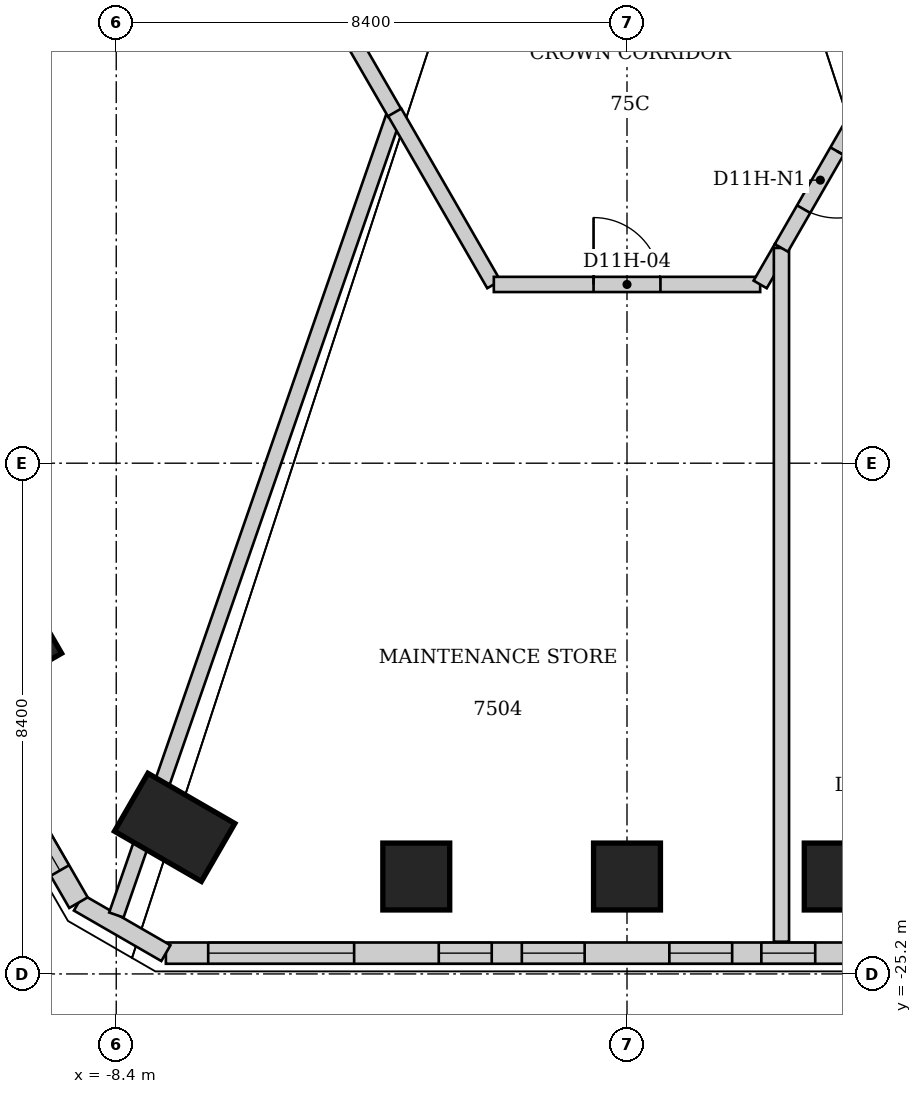
"""IFC4 building model, lengths in metres.
Left out: names, types, materials, properties, quantities, classifications, styles, units other than length and angle.
Written with IfcOpenShell. Run it as: python <this file> out.ifc"""

import sys

from ifc_helpers import new_model, si_unit, direction, frame, frame_2d, origin, origin_2d, place, context, subcontext, project, spatial, polyline, rectangle, outline, extrude, element, fill, save


model = new_model("IFC4")
c1 = context("Model", 3, precision=1e-05, world=origin(), true_north=direction((0.0, 1.0)))
c2 = subcontext(c1, "Body", "Model", "MODEL_VIEW")
j1 = project(units=[si_unit("LENGTHUNIT", "METRE"), si_unit("PLANEANGLEUNIT", "RADIAN")], contexts=[c1])
p1 = place(None, origin())
s1 = spatial("IfcSite", under=j1, at=p1, CompositionType="ELEMENT")
p2 = place(p1, origin())
s2 = spatial("IfcBuilding", under=s1, at=p2, CompositionType="ELEMENT")
p3 = place(p2, frame((0.0, 0.0, 298.8)))
s3 = spatial("IfcBuildingStorey", under=s2, at=p3, CompositionType="ELEMENT", Elevation=298.8)
for number, where, z_axis, x_axis in (
    (1, (3.466, -23.598, 0.0), (0.0, 0.0, 1.0), (0.0, -1.0, 0.0)),
    (2, (0.0, -23.598, 0.0), (0.0, 0.0, 1.0), (0.0, -1.0, 0.0)),
    (3, (-3.466, -23.598, 0.0), (0.0, 0.0, 1.0), (0.0, -1.0, 0.0)),
):
    element("IfcColumn", number, at=place(p3, frame(where, z_axis=z_axis, x_axis=x_axis)), inside=s3, PredefinedType="COLUMN", context=c2, shape_type="SweptSolid", body=[
        extrude(rectangle(XDim=1.1, YDim=1.1, at=origin_2d()), origin(), (0.0, 0.0, 1.0), 6.118),
    ])
p4 = place(p3, frame((-7.439, -22.79, 0.0), z_axis=(0.0, 0.0, 1.0), x_axis=(-0.5, -0.866025403784, 0.0)))
e4 = element("IfcColumn", 4, at=p4, inside=s3, PredefinedType="COLUMN", context=c2, shape_type="SweptSolid", body=[
    extrude(rectangle(XDim=1.1, YDim=1.65, at=origin_2d()), origin(), (0.0, 0.0, 1.0), 6.335),
])
p5 = place(p3, frame((-10.05, -19.725, 0.0), z_axis=(0.0, 0.0, 1.0), x_axis=(-0.866025403784, -0.5, 0.0)))
e5 = element("IfcColumn", 5, at=p5, inside=s3, PredefinedType="COLUMN", context=c2, shape_type="SweptSolid", body=[
    extrude(rectangle(XDim=1.1, YDim=1.1, at=origin_2d()), origin(), (0.0, 0.0, 1.0), 7.156),
])
p6 = place(p3, frame((7.583, -24.858, 0.0), z_axis=(0.0, 0.0, 1.0), x_axis=(-1.0, 0.0, 0.0)))
e6 = element("IfcWall", 6, at=p6, inside=s3, PredefinedType="SOLIDWALL", context=c2, shape_type="SweptSolid", body=[
    extrude(outline(polyline([(0.0, 0.0), (15.167, 0.0), (15.167, 5.775), (0.0, 5.775), (0.0, 0.0)])), frame((0.0, 0.175, 0.0), z_axis=(0.0, -1.0, 0.0), x_axis=(1.0, 0.0, 0.0)), (0.0, 0.0, 1.0), 0.35),
])
p7 = place(p6, frame((0.696, 0.0, 0.6)))
e7 = element("IfcOpeningElement", 7, at=p7, cuts=e6, PredefinedType="OPENING", context=c2, shape_type="SweptSolid", body=[
    extrude(rectangle(XDim=2.4, YDim=3.6, at=frame_2d((1.2, 1.8))), frame((0.0, 0.185, 0.0), z_axis=(0.0, -1.0, 0.0), x_axis=(1.0, 0.0, 0.0)), (0.0, 0.0, 1.0), 0.37),
])
p8 = place(p6, frame((4.488, 0.0, 2.729)))
e8 = element("IfcOpeningElement", 8, at=p8, cuts=e6, PredefinedType="OPENING", context=c2, shape_type="SweptSolid", body=[
    extrude(rectangle(XDim=0.886, YDim=1.471, at=frame_2d((0.443, 0.735))), frame((0.0, 0.185, 0.0), z_axis=(0.0, -1.0, 0.0), x_axis=(1.0, 0.0, 0.0)), (0.0, 0.0, 1.0), 0.37),
])
p9 = place(p6, frame((5.854, 0.0, 0.601)))
e9 = element("IfcOpeningElement", 9, at=p9, cuts=e6, PredefinedType="OPENING", context=c2, shape_type="SweptSolid", body=[
    extrude(rectangle(XDim=1.033, YDim=1.719, at=frame_2d((0.517, 0.859))), frame((0.0, 0.185, 0.0), z_axis=(0.0, -1.0, 0.0), x_axis=(1.0, 0.0, 0.0)), (0.0, 0.0, 1.0), 0.37),
])
p10 = place(p6, frame((8.28, 0.0, 0.601)))
e10 = element("IfcOpeningElement", 10, at=p10, cuts=e6, PredefinedType="OPENING", context=c2, shape_type="SweptSolid", body=[
    extrude(rectangle(XDim=1.033, YDim=1.719, at=frame_2d((0.517, 0.859))), frame((0.0, 0.185, 0.0), z_axis=(0.0, -1.0, 0.0), x_axis=(1.0, 0.0, 0.0)), (0.0, 0.0, 1.0), 0.37),
])
p11 = place(p6, frame((9.808, 0.0, 2.704)))
e11 = element("IfcOpeningElement", 11, at=p11, cuts=e6, PredefinedType="OPENING", context=c2, shape_type="SweptSolid", body=[
    extrude(rectangle(XDim=0.871, YDim=1.496, at=frame_2d((0.436, 0.748))), frame((0.0, 0.185, 0.0), z_axis=(0.0, -1.0, 0.0), x_axis=(1.0, 0.0, 0.0)), (0.0, 0.0, 1.0), 0.37),
])
p12 = place(p6, frame((12.071, 0.0, 0.6)))
e12 = element("IfcOpeningElement", 12, at=p12, cuts=e6, PredefinedType="OPENING", context=c2, shape_type="SweptSolid", body=[
    extrude(rectangle(XDim=2.4, YDim=3.6, at=frame_2d((1.2, 1.8))), frame((0.0, 0.185, 0.0), z_axis=(0.0, -1.0, 0.0), x_axis=(1.0, 0.0, 0.0)), (0.0, 0.0, 1.0), 0.37),
])
p13 = place(p3, frame((-7.583, -24.858, 0.0), z_axis=(0.0, 0.0, 1.0), x_axis=(-0.865989634427, 0.500061949227, 0.0)))
e13 = element("IfcWall", 13, at=p13, inside=s3, PredefinedType="SOLIDWALL", context=c2, shape_type="SweptSolid", body=[
    extrude(outline(polyline([(0.0, 0.0), (1.66, 0.0), (1.66, 6.009), (0.0, 5.787), (0.0, 0.0)])), frame((0.0, 0.15, 0.0), z_axis=(0.0, -1.0, 0.0), x_axis=(1.0, 0.0, 0.0)), (0.0, 0.0, 1.0), 0.3),
])
p14 = place(p3, frame((-9.021, -24.028, 0.0), z_axis=(0.0, 0.0, 1.0), x_axis=(-0.499997560549, 0.866026812198, 0.0)))
e14 = element("IfcWall", 14, at=p14, inside=s3, PredefinedType="SOLIDWALL", context=c2, shape_type="SweptSolid", body=[
    extrude(outline(polyline([(0.0, 0.0), (32.597, 0.0), (32.597, 13.584), (0.0, 6.021), (0.0, 0.0)])), frame((0.0, 0.175, 0.0), z_axis=(0.0, -1.0, 0.0), x_axis=(1.0, 0.0, 0.0)), (0.0, 0.0, 1.0), 0.35),
])
p15 = place(p14, frame((0.611, 0.0, 0.6)))
e15 = element("IfcOpeningElement", 15, at=p15, cuts=e14, PredefinedType="OPENING", context=c2, shape_type="SweptSolid", body=[
    extrude(rectangle(XDim=2.4, YDim=3.6, at=frame_2d((1.2, 1.8))), frame((0.0, 0.185, 0.0), z_axis=(0.0, -1.0, 0.0), x_axis=(1.0, 0.0, 0.0)), (0.0, 0.0, 1.0), 0.37),
])
p16 = place(p14, frame((4.233, 0.0, 0.6)))
e16 = element("IfcOpeningElement", 16, at=p16, cuts=e14, PredefinedType="OPENING", context=c2, shape_type="SweptSolid", body=[
    extrude(rectangle(XDim=2.4, YDim=3.6, at=frame_2d((1.2, 1.8))), frame((0.0, 0.185, 0.0), z_axis=(0.0, -1.0, 0.0), x_axis=(1.0, 0.0, 0.0)), (0.0, 0.0, 1.0), 0.37),
])
p17 = place(p14, frame((7.855, 0.0, 2.72)))
e17 = element("IfcOpeningElement", 17, at=p17, cuts=e14, PredefinedType="OPENING", context=c2, shape_type="SweptSolid", body=[
    extrude(rectangle(XDim=0.6, YDim=1.48, at=frame_2d((0.3, 0.74))), frame((0.0, 0.185, 0.0), z_axis=(0.0, -1.0, 0.0), x_axis=(1.0, 0.0, 0.0)), (0.0, 0.0, 1.0), 0.37),
])
p18 = place(p14, frame((9.259, 0.0, 0.601)))
e18 = element("IfcOpeningElement", 18, at=p18, cuts=e14, PredefinedType="OPENING", context=c2, shape_type="SweptSolid", body=[
    extrude(rectangle(XDim=0.995, YDim=2.449, at=frame_2d((0.498, 1.225))), frame((0.0, 0.185, 0.0), z_axis=(0.0, -1.0, 0.0), x_axis=(1.0, 0.0, 0.0)), (0.0, 0.0, 1.0), 0.37),
])
p19 = place(p14, frame((11.477, 0.0, 0.601)))
e19 = element("IfcOpeningElement", 19, at=p19, cuts=e14, PredefinedType="OPENING", context=c2, shape_type="SweptSolid", body=[
    extrude(rectangle(XDim=1.261, YDim=3.099, at=frame_2d((0.63, 1.55))), frame((0.0, 0.185, 0.0), z_axis=(0.0, -1.0, 0.0), x_axis=(1.0, 0.0, 0.0)), (0.0, 0.0, 1.0), 0.37),
])
p20 = place(p14, frame((15.098, 0.0, 0.6)))
e20 = element("IfcOpeningElement", 20, at=p20, cuts=e14, PredefinedType="OPENING", context=c2, shape_type="SweptSolid", body=[
    extrude(rectangle(XDim=2.4, YDim=3.6, at=frame_2d((1.2, 1.8))), frame((0.0, 0.185, 0.0), z_axis=(0.0, -1.0, 0.0), x_axis=(1.0, 0.0, 0.0)), (0.0, 0.0, 1.0), 0.37),
])
p21 = place(p14, frame((19.676, 0.0, 0.601)))
e21 = element("IfcOpeningElement", 21, at=p21, cuts=e14, PredefinedType="OPENING", context=c2, shape_type="SweptSolid", body=[
    extrude(rectangle(XDim=1.444, YDim=3.599, at=frame_2d((0.722, 1.8))), frame((0.0, 0.185, 0.0), z_axis=(0.0, -1.0, 0.0), x_axis=(1.0, 0.0, 0.0)), (0.0, 0.0, 1.0), 0.37),
])
p22 = place(p14, frame((22.343, 0.0, 0.601)))
e22 = element("IfcOpeningElement", 22, at=p22, cuts=e14, PredefinedType="OPENING", context=c2, shape_type="SweptSolid", body=[
    extrude(rectangle(XDim=1.024, YDim=3.249, at=frame_2d((0.512, 1.625))), frame((0.0, 0.185, 0.0), z_axis=(0.0, -1.0, 0.0), x_axis=(1.0, 0.0, 0.0)), (0.0, 0.0, 1.0), 0.37),
])
p23 = place(p14, frame((24.285, 0.0, 3.005)))
e23 = element("IfcOpeningElement", 23, at=p23, cuts=e14, PredefinedType="OPENING", context=c2, shape_type="SweptSolid", body=[
    extrude(rectangle(XDim=0.457, YDim=1.195, at=frame_2d((0.229, 0.598))), frame((0.0, 0.185, 0.0), z_axis=(0.0, -1.0, 0.0), x_axis=(1.0, 0.0, 0.0)), (0.0, 0.0, 1.0), 0.37),
])
p24 = place(p14, frame((25.964, 0.0, 0.6)))
e24 = element("IfcOpeningElement", 24, at=p24, cuts=e14, PredefinedType="OPENING", context=c2, shape_type="SweptSolid", body=[
    extrude(rectangle(XDim=2.4, YDim=3.6, at=frame_2d((1.2, 1.8))), frame((0.0, 0.185, 0.0), z_axis=(0.0, -1.0, 0.0), x_axis=(1.0, 0.0, 0.0)), (0.0, 0.0, 1.0), 0.37),
])
p25 = place(p14, frame((29.586, 0.0, 0.6)))
e25 = element("IfcOpeningElement", 25, at=p25, cuts=e14, PredefinedType="OPENING", context=c2, shape_type="SweptSolid", body=[
    extrude(rectangle(XDim=2.4, YDim=3.6, at=frame_2d((1.2, 1.8))), frame((0.0, 0.185, 0.0), z_axis=(0.0, -1.0, 0.0), x_axis=(1.0, 0.0, 0.0)), (0.0, 0.0, 1.0), 0.37),
])
p26 = place(p14, frame((13.498, 0.0, 5.6)))
e26 = element("IfcOpeningElement", 26, at=p26, cuts=e14, PredefinedType="OPENING", context=c2, shape_type="SweptSolid", body=[
    extrude(rectangle(XDim=2.0, YDim=2.4, at=frame_2d((1.0, 1.2))), frame((0.0, 0.185, 0.0), z_axis=(0.0, -1.0, 0.0), x_axis=(1.0, 0.0, 0.0)), (0.0, 0.0, 1.0), 0.37),
])
p27 = place(p14, frame((17.098, 0.0, 5.6)))
e27 = element("IfcOpeningElement", 27, at=p27, cuts=e14, PredefinedType="OPENING", context=c2, shape_type="SweptSolid", body=[
    extrude(rectangle(XDim=2.0, YDim=2.4, at=frame_2d((1.0, 1.2))), frame((0.0, 0.185, 0.0), z_axis=(0.0, -1.0, 0.0), x_axis=(1.0, 0.0, 0.0)), (0.0, 0.0, 1.0), 0.37),
])
p28 = place(p14, frame((20.792, 0.0, 5.601)))
e28 = element("IfcOpeningElement", 28, at=p28, cuts=e14, PredefinedType="OPENING", context=c2, shape_type="SweptSolid", body=[
    extrude(rectangle(XDim=1.348, YDim=2.124, at=frame_2d((0.674, 1.062))), frame((0.0, 0.185, 0.0), z_axis=(0.0, -1.0, 0.0), x_axis=(1.0, 0.0, 0.0)), (0.0, 0.0, 1.0), 0.37),
])
p29 = place(p14, frame((24.298, 0.0, 5.6)))
e29 = element("IfcOpeningElement", 29, at=p29, cuts=e14, PredefinedType="OPENING", context=c2, shape_type="SweptSolid", body=[
    extrude(rectangle(XDim=2.0, YDim=2.4, at=frame_2d((1.0, 1.2))), frame((0.0, 0.185, 0.0), z_axis=(0.0, -1.0, 0.0), x_axis=(1.0, 0.0, 0.0)), (0.0, 0.0, 1.0), 0.37),
])
p30 = place(p14, frame((27.898, 0.0, 5.6)))
e30 = element("IfcOpeningElement", 30, at=p30, cuts=e14, PredefinedType="OPENING", context=c2, shape_type="SweptSolid", body=[
    extrude(rectangle(XDim=2.0, YDim=2.4, at=frame_2d((1.0, 1.2))), frame((0.0, 0.185, 0.0), z_axis=(0.0, -1.0, 0.0), x_axis=(1.0, 0.0, 0.0)), (0.0, 0.0, 1.0), 0.37),
])
p31 = place(p3, frame((-8.398, -24.23, 0.0), z_axis=(0.0, 0.0, 1.0), x_axis=(0.327859974014, 0.944726329388, 0.0)))
e31 = element("IfcWall", 31, at=p31, inside=s3, PredefinedType="PARTITIONING", context=c2, shape_type="SweptSolid", body=[
    extrude(rectangle(XDim=13.962, YDim=0.25, at=frame_2d((6.981, 0.0))), origin(), (0.0, 0.0, 1.0), 5.0),
])
p32 = place(p3, frame((-3.82, -11.04, 0.0), z_axis=(0.0, 0.0, 1.0), x_axis=(-0.50042430987, 0.865780289733, 0.0)))
e32 = element("IfcWall", 32, at=p32, inside=s3, PredefinedType="PARTITIONING", context=c2, shape_type="SweptSolid", body=[
    extrude(rectangle(XDim=2.218, YDim=0.25, at=frame_2d((1.109, 0.0))), origin(), (0.0, 0.0, 1.0), 5.0),
])
p33 = place(p3, frame((-2.19, -13.86, 0.0), z_axis=(0.0, 0.0, 1.0), x_axis=(-0.499122654151, 0.86653134745, 0.0)))
e33 = element("IfcWall", 33, at=p33, inside=s3, PredefinedType="PARTITIONING", context=c2, shape_type="SweptSolid", body=[
    extrude(rectangle(XDim=3.266, YDim=0.25, at=frame_2d((1.633, 0.0))), origin(), (0.0, 0.0, 1.0), 5.0),
])
p34 = place(p3, frame((-2.19, -13.86, 0.0), z_axis=(0.0, 0.0, 1.0), x_axis=(1.0, 0.0, 0.0)))
e34 = element("IfcWall", 34, at=p34, inside=s3, PredefinedType="PARTITIONING", context=c2, shape_type="SweptSolid", body=[
    extrude(rectangle(XDim=4.38, YDim=0.25, at=frame_2d((2.19, 0.0))), origin(), (0.0, 0.0, 1.0), 5.0),
])
p35 = place(p34, frame((1.64, 0.0, 0.0)))
e35 = element("IfcOpeningElement", 35, at=p35, cuts=e34, PredefinedType="OPENING", context=c2, shape_type="SweptSolid", body=[
    extrude(rectangle(XDim=1.1, YDim=2.2, at=frame_2d((0.55, 1.1))), frame((0.0, 0.125, 0.0), z_axis=(0.0, -1.0, 0.0), x_axis=(1.0, 0.0, 0.0)), (0.0, 0.0, 1.0), 0.25),
])
p36 = place(p3, frame((2.19, -13.86, 0.0), z_axis=(0.0, 0.0, 1.0), x_axis=(0.501465632015, 0.865177565537, 0.0)))
e36 = element("IfcWall", 36, at=p36, inside=s3, PredefinedType="PARTITIONING", context=c2, shape_type="SweptSolid", body=[
    extrude(rectangle(XDim=0.695, YDim=0.25, at=frame_2d((0.347, 0.0))), origin(), (0.0, 0.0, 1.0), 5.0),
])
p37 = place(p3, frame((2.54, -13.26, 0.0), z_axis=(0.0, 0.0, 1.0), x_axis=(0.0, -1.0, 0.0)))
e37 = element("IfcWall", 37, at=p37, inside=s3, PredefinedType="PARTITIONING", context=c2, shape_type="SweptSolid", body=[
    extrude(rectangle(XDim=11.41, YDim=0.25, at=frame_2d((5.705, 0.0))), origin(), (0.0, 0.0, 1.0), 5.0),
])
p38 = place(p3, frame((3.82, -11.03, 0.0), z_axis=(0.0, 0.0, 1.0), x_axis=(-0.498488963566, -0.866896045211, 0.0)))
e38 = element("IfcWall", 38, at=p38, inside=s3, PredefinedType="PARTITIONING", context=c2, shape_type="SweptSolid", body=[
    extrude(rectangle(XDim=2.571, YDim=0.25, at=frame_2d((1.286, 0.0))), origin(), (0.0, 0.0, 1.0), 5.0),
])
p39 = place(p38, frame((0.736, 0.0, 0.0)))
e39 = element("IfcOpeningElement", 39, at=p39, cuts=e38, PredefinedType="OPENING", context=c2, shape_type="SweptSolid", body=[
    extrude(rectangle(XDim=1.1, YDim=2.2, at=frame_2d((0.55, 1.1))), frame((0.0, 0.125, 0.0), z_axis=(0.0, -1.0, 0.0), x_axis=(1.0, 0.0, 0.0)), (0.0, 0.0, 1.0), 0.25),
])
p40 = place(p8, origin())
e40 = element("IfcWindow", 40, at=p40, inside=s3, PartitioningType="SINGLE_PANEL", PredefinedType="WINDOW", context=c2, shape_type="SweptSolid", body=[
    extrude(rectangle(XDim=0.886, YDim=1.471, at=frame_2d((0.443, 0.735))), frame((0.0, 0.03, 0.0), z_axis=(0.0, -1.0, 0.0), x_axis=(1.0, 0.0, 0.0)), (0.0, 0.0, 1.0), 0.06),
])
fill(e8, e40)
p41 = place(p9, origin())
e41 = element("IfcWindow", 41, at=p41, inside=s3, PartitioningType="SINGLE_PANEL", PredefinedType="WINDOW", context=c2, shape_type="SweptSolid", body=[
    extrude(rectangle(XDim=1.033, YDim=1.719, at=frame_2d((0.517, 0.859))), frame((0.0, 0.03, 0.0), z_axis=(0.0, -1.0, 0.0), x_axis=(1.0, 0.0, 0.0)), (0.0, 0.0, 1.0), 0.06),
])
fill(e9, e41)
p42 = place(p10, origin())
e42 = element("IfcWindow", 42, at=p42, inside=s3, PartitioningType="SINGLE_PANEL", PredefinedType="WINDOW", context=c2, shape_type="SweptSolid", body=[
    extrude(rectangle(XDim=1.033, YDim=1.719, at=frame_2d((0.517, 0.859))), frame((0.0, 0.03, 0.0), z_axis=(0.0, -1.0, 0.0), x_axis=(1.0, 0.0, 0.0)), (0.0, 0.0, 1.0), 0.06),
])
fill(e10, e42)
p43 = place(p11, origin())
e43 = element("IfcWindow", 43, at=p43, inside=s3, PartitioningType="SINGLE_PANEL", PredefinedType="WINDOW", context=c2, shape_type="SweptSolid", body=[
    extrude(rectangle(XDim=0.871, YDim=1.496, at=frame_2d((0.436, 0.748))), frame((0.0, 0.03, 0.0), z_axis=(0.0, -1.0, 0.0), x_axis=(1.0, 0.0, 0.0)), (0.0, 0.0, 1.0), 0.06),
])
fill(e11, e43)
p44 = place(p12, origin())
e44 = element("IfcWindow", 44, at=p44, inside=s3, PartitioningType="SINGLE_PANEL", PredefinedType="WINDOW", context=c2, shape_type="SweptSolid", body=[
    extrude(rectangle(XDim=2.4, YDim=3.6, at=frame_2d((1.2, 1.8))), frame((0.0, 0.03, 0.0), z_axis=(0.0, -1.0, 0.0), x_axis=(1.0, 0.0, 0.0)), (0.0, 0.0, 1.0), 0.06),
])
fill(e12, e44)
p45 = place(p15, origin())
e45 = element("IfcWindow", 45, at=p45, inside=s3, PartitioningType="SINGLE_PANEL", PredefinedType="WINDOW", context=c2, shape_type="SweptSolid", body=[
    extrude(rectangle(XDim=2.4, YDim=3.6, at=frame_2d((1.2, 1.8))), frame((0.0, 0.03, 0.0), z_axis=(0.0, -1.0, 0.0), x_axis=(1.0, 0.0, 0.0)), (0.0, 0.0, 1.0), 0.06),
])
fill(e15, e45)
p46 = place(p35, origin())
e46 = element("IfcDoor", 46, at=p46, inside=s3, OperationType="SINGLE_SWING_LEFT", PredefinedType="DOOR", context=c2, shape_type="SweptSolid", body=[
    extrude(rectangle(XDim=1.1, YDim=2.2, at=frame_2d((0.55, 1.1))), frame((0.0, 0.025, 0.0), z_axis=(0.0, -1.0, 0.0), x_axis=(1.0, 0.0, 0.0)), (0.0, 0.0, 1.0), 0.05),
])
fill(e35, e46)
p47 = place(p39, origin())
e47 = element("IfcDoor", 47, at=p47, inside=s3, OperationType="SINGLE_SWING_LEFT", PredefinedType="DOOR", context=c2, shape_type="SweptSolid", body=[
    extrude(rectangle(XDim=1.1, YDim=2.2, at=frame_2d((0.55, 1.1))), frame((0.0, 0.025, 0.0), z_axis=(0.0, -1.0, 0.0), x_axis=(1.0, 0.0, 0.0)), (0.0, 0.0, 1.0), 0.05),
])
fill(e39, e47)
save(model, sys.argv[1])
